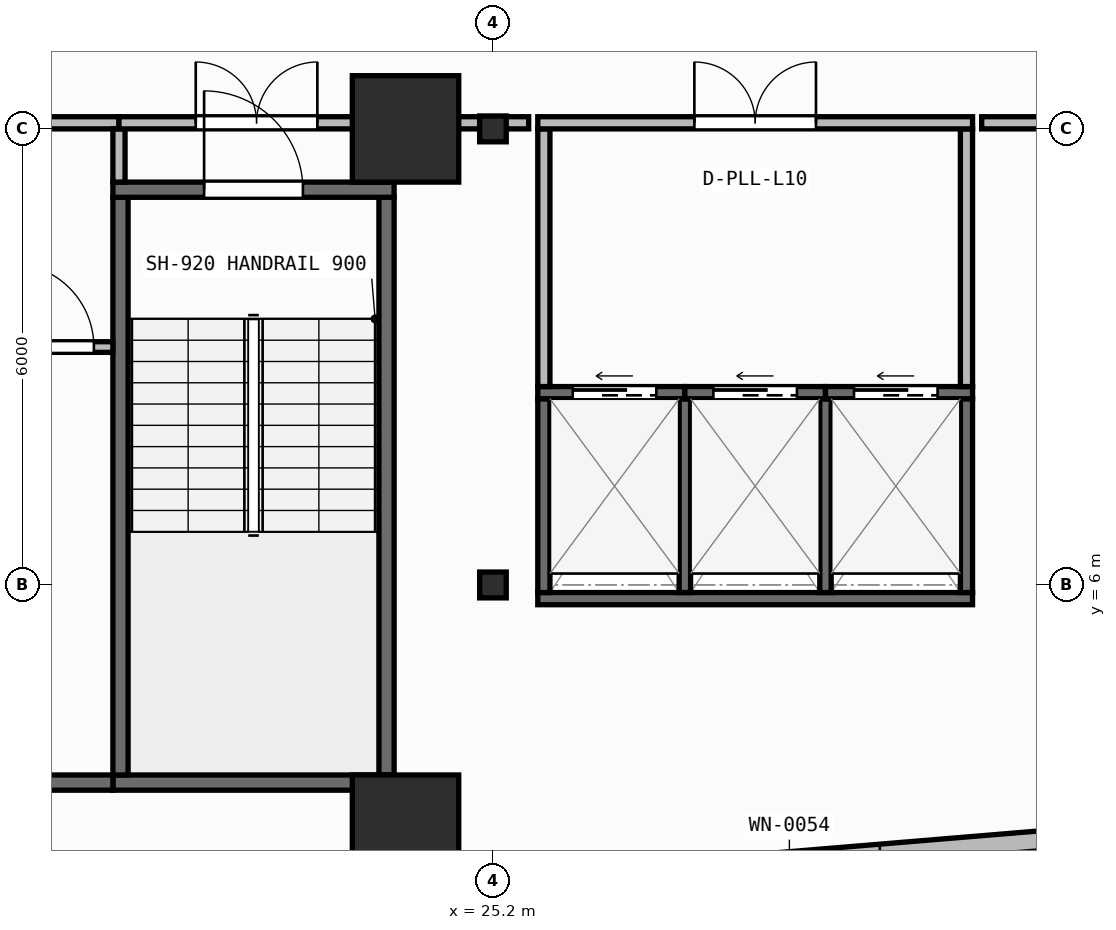
"""IFC4 building model, lengths in metres.
Left out: names, types, materials, properties, quantities, classifications, styles, units other than length and angle.
Written with IfcOpenShell. Run it as: python <this file> out.ifc"""

import sys

from ifc_helpers import new_model, si_unit, direction, frame, frame_2d, origin, origin_2d, place, context, subcontext, project, spatial, rectangle, i_section, extrude, element, fill, save


model = new_model("IFC4")
c1 = context("Model", 3, precision=1e-05, world=origin(), true_north=direction((0.0, 1.0)))
c2 = subcontext(c1, "Body", "Model", "MODEL_VIEW")
j1 = project(units=[si_unit("LENGTHUNIT", "METRE"), si_unit("PLANEANGLEUNIT", "RADIAN")], contexts=[c1])
p1 = place(None, origin())
s1 = spatial("IfcSite", under=j1, at=p1, CompositionType="ELEMENT")
p2 = place(p1, origin())
s2 = spatial("IfcBuilding", under=s1, at=p2, CompositionType="ELEMENT")
p3 = place(p2, frame((0.0, 0.0, 42.25)))
s3 = spatial("IfcBuildingStorey", under=s2, at=p3, CompositionType="ELEMENT", Elevation=42.25)
p4 = place(p3, frame((24.05, 2.8, 0.0), z_axis=(0.0, 0.0, 1.0), x_axis=(1.0, 0.0, 0.0)))
e1 = element("IfcColumn", 1, at=p4, inside=s3, PredefinedType="COLUMN", context=c2, shape_type="SweptSolid", body=[
    extrude(rectangle(XDim=1.4, YDim=1.4, at=origin_2d()), origin(), (0.0, 0.0, 1.0), 3.95),
])
p5 = place(p3, frame((25.2, 6.0, 0.0), z_axis=(0.0, 0.0, 1.0), x_axis=(1.0, 0.0, 0.0)))
e2 = element("IfcColumn", 2, at=p5, inside=s3, PredefinedType="COLUMN", context=c2, shape_type="SweptSolid", body=[
    extrude(i_section(OverallWidth=0.35, OverallDepth=0.34, WebThickness=0.016, FlangeThickness=0.028, at=origin_2d()), origin(), (0.0, 0.0, 1.0), 3.95),
])
p6 = place(p3, frame((24.05, 12.0, 0.0), z_axis=(0.0, 0.0, 1.0), x_axis=(1.0, 0.0, 0.0)))
e3 = element("IfcColumn", 3, at=p6, inside=s3, PredefinedType="COLUMN", context=c2, shape_type="SweptSolid", body=[
    extrude(rectangle(XDim=1.4, YDim=1.4, at=origin_2d()), origin(), (0.0, 0.0, 1.0), 3.95),
])
p7 = place(p3, frame((25.2, 12.0, 0.0), z_axis=(0.0, 0.0, 1.0), x_axis=(1.0, 0.0, 0.0)))
e4 = element("IfcColumn", 4, at=p7, inside=s3, PredefinedType="COLUMN", context=c2, shape_type="SweptSolid", body=[
    extrude(i_section(OverallWidth=0.35, OverallDepth=0.34, WebThickness=0.016, FlangeThickness=0.028, at=origin_2d()), origin(), (0.0, 0.0, 1.0), 3.95),
])
p8 = place(p3, frame((2.76, 0.174, 0.0), z_axis=(0.0, 0.0, 1.0), x_axis=(0.996571478456, 0.082736257641, 0.0)))
e5 = element("IfcWall", 5, at=p8, inside=s3, PredefinedType="STANDARD", context=c2, shape_type="SweptSolid", body=[
    extrude(rectangle(XDim=52.861, YDim=0.26, at=frame_2d((26.431, 0.0))), origin(), (0.0, 0.0, 1.0), 3.71),
])
p9 = place(p8, frame((25.231, 0.0, 0.9)))
e6 = element("IfcOpeningElement", 6, at=p9, cuts=e5, PredefinedType="OPENING", context=c2, shape_type="SweptSolid", body=[
    extrude(rectangle(XDim=2.4, YDim=1.65, at=frame_2d((1.2, 0.825))), frame((0.0, 0.14, 0.0), z_axis=(0.0, -1.0, 0.0), x_axis=(1.0, 0.0, 0.0)), (0.0, 0.0, 1.0), 0.28),
])
p10 = place(p3, frame((20.2, 3.4, 0.0), z_axis=(0.0, 0.0, 1.0), x_axis=(1.0, 0.0, 0.0)))
e7 = element("IfcWall", 7, at=p10, inside=s3, PredefinedType="SHEAR", context=c2, shape_type="SweptSolid", body=[
    extrude(rectangle(XDim=3.7, YDim=0.2, at=frame_2d((1.85, 0.0))), origin(), (0.0, 0.0, 1.0), 3.71),
])
for number, where, z_axis, x_axis in (
    (8, (20.3, 3.5, 0.0), (0.0, 0.0, 1.0), (0.0, 1.0, 0.0)),
    (9, (23.8, 3.5, 0.0), (0.0, 0.0, 1.0), (0.0, 1.0, 0.0)),
):
    element("IfcWall", number, at=place(p3, frame(where, z_axis=z_axis, x_axis=x_axis)), inside=s3, PredefinedType="SHEAR", context=c2, shape_type="SweptSolid", body=[
        extrude(rectangle(XDim=7.6, YDim=0.2, at=frame_2d((3.8, 0.0))), origin(), (0.0, 0.0, 1.0), 3.71),
    ])
p11 = place(p3, frame((20.2, 11.2, 0.0), z_axis=(0.0, 0.0, 1.0), x_axis=(1.0, 0.0, 0.0)))
e10 = element("IfcWall", 10, at=p11, inside=s3, PredefinedType="SHEAR", context=c2, shape_type="SweptSolid", body=[
    extrude(rectangle(XDim=3.7, YDim=0.2, at=frame_2d((1.85, 0.0))), origin(), (0.0, 0.0, 1.0), 3.71),
])
p12 = place(p11, frame((1.2, 0.0, 0.0)))
e11 = element("IfcOpeningElement", 11, at=p12, cuts=e10, PredefinedType="OPENING", context=c2, shape_type="SweptSolid", body=[
    extrude(rectangle(XDim=1.3, YDim=2.15, at=frame_2d((0.65, 1.075))), frame((0.0, 0.11, 0.0), z_axis=(0.0, -1.0, 0.0), x_axis=(1.0, 0.0, 0.0)), (0.0, 0.0, 1.0), 0.22),
])
p13 = place(p3, frame((6.5, 3.4, 0.0), z_axis=(0.0, 0.0, 1.0), x_axis=(1.0, 0.0, 0.0)))
e12 = element("IfcWall", 12, at=p13, inside=s3, PredefinedType="SHEAR", context=c2, shape_type="SweptSolid", body=[
    extrude(rectangle(XDim=13.7, YDim=0.2, at=frame_2d((6.85, 0.0))), origin(), (0.0, 0.0, 1.0), 3.71),
])
p14 = place(p3, frame((25.79, 5.82, 0.0), z_axis=(0.0, 0.0, 1.0), x_axis=(1.0, 0.0, 0.0)))
e13 = element("IfcWall", 13, at=p14, inside=s3, PredefinedType="SHEAR", context=c2, shape_type="SweptSolid", body=[
    extrude(rectangle(XDim=5.72, YDim=0.16, at=frame_2d((2.86, 0.0))), origin(), (0.0, 0.0, 1.0), 3.71),
])
for number, where, z_axis, x_axis in (
    (14, (25.87, 5.9, 0.0), (0.0, 0.0, 1.0), (0.0, 1.0, 0.0)),
    (15, (31.43, 5.9, 0.0), (0.0, 0.0, 1.0), (0.0, 1.0, 0.0)),
):
    element("IfcWall", number, at=place(p3, frame(where, z_axis=z_axis, x_axis=x_axis)), inside=s3, PredefinedType="SHEAR", context=c2, shape_type="SweptSolid", body=[
        extrude(rectangle(XDim=2.55, YDim=0.16, at=frame_2d((1.275, 0.0))), origin(), (0.0, 0.0, 1.0), 3.71),
    ])
for number, where, z_axis, x_axis in (
    (16, (27.725, 5.9, 0.0), (0.0, 0.0, 1.0), (0.0, 1.0, 0.0)),
    (17, (29.575, 5.9, 0.0), (0.0, 0.0, 1.0), (0.0, 1.0, 0.0)),
):
    element("IfcWall", number, at=place(p3, frame(where, z_axis=z_axis, x_axis=x_axis)), inside=s3, PredefinedType="SHEAR", context=c2, shape_type="SweptSolid", body=[
        extrude(rectangle(XDim=2.55, YDim=0.15, at=frame_2d((1.275, 0.0))), origin(), (0.0, 0.0, 1.0), 3.71),
    ])
p15 = place(p3, frame((25.79, 8.53, 0.0), z_axis=(0.0, 0.0, 1.0), x_axis=(1.0, 0.0, 0.0)))
e18 = element("IfcWall", 18, at=p15, inside=s3, PredefinedType="SHEAR", context=c2, shape_type="SweptSolid", body=[
    extrude(rectangle(XDim=1.935, YDim=0.16, at=frame_2d((0.968, 0.0))), origin(), (0.0, 0.0, 1.0), 3.71),
])
p16 = place(p15, frame((0.46, 0.0, 0.0)))
e19 = element("IfcOpeningElement", 19, at=p16, cuts=e18, PredefinedType="OPENING", context=c2, shape_type="SweptSolid", body=[
    extrude(rectangle(XDim=1.1, YDim=2.15, at=frame_2d((0.55, 1.075))), frame((0.0, 0.09, 0.0), z_axis=(0.0, -1.0, 0.0), x_axis=(1.0, 0.0, 0.0)), (0.0, 0.0, 1.0), 0.18),
])
p17 = place(p3, frame((27.725, 8.53, 0.0), z_axis=(0.0, 0.0, 1.0), x_axis=(1.0, 0.0, 0.0)))
e20 = element("IfcWall", 20, at=p17, inside=s3, PredefinedType="SHEAR", context=c2, shape_type="SweptSolid", body=[
    extrude(rectangle(XDim=1.85, YDim=0.16, at=frame_2d((0.925, 0.0))), origin(), (0.0, 0.0, 1.0), 3.71),
])
p18 = place(p17, frame((0.375, 0.0, 0.0)))
e21 = element("IfcOpeningElement", 21, at=p18, cuts=e20, PredefinedType="OPENING", context=c2, shape_type="SweptSolid", body=[
    extrude(rectangle(XDim=1.1, YDim=2.15, at=frame_2d((0.55, 1.075))), frame((0.0, 0.09, 0.0), z_axis=(0.0, -1.0, 0.0), x_axis=(1.0, 0.0, 0.0)), (0.0, 0.0, 1.0), 0.18),
])
p19 = place(p3, frame((29.575, 8.53, 0.0), z_axis=(0.0, 0.0, 1.0), x_axis=(1.0, 0.0, 0.0)))
e22 = element("IfcWall", 22, at=p19, inside=s3, PredefinedType="SHEAR", context=c2, shape_type="SweptSolid", body=[
    extrude(rectangle(XDim=1.935, YDim=0.16, at=frame_2d((0.968, 0.0))), origin(), (0.0, 0.0, 1.0), 3.71),
])
p20 = place(p19, frame((0.375, 0.0, 0.0)))
e23 = element("IfcOpeningElement", 23, at=p20, cuts=e22, PredefinedType="OPENING", context=c2, shape_type="SweptSolid", body=[
    extrude(rectangle(XDim=1.1, YDim=2.15, at=frame_2d((0.55, 1.075))), frame((0.0, 0.09, 0.0), z_axis=(0.0, -1.0, 0.0), x_axis=(1.0, 0.0, 0.0)), (0.0, 0.0, 1.0), 0.18),
])
p21 = place(p3, frame((18.61, 9.13, 0.0), z_axis=(0.0, 0.0, 1.0), x_axis=(1.0, 0.0, 0.0)))
e24 = element("IfcWall", 24, at=p21, inside=s3, PredefinedType="PARTITIONING", context=c2, shape_type="SweptSolid", body=[
    extrude(rectangle(XDim=1.59, YDim=0.14, at=frame_2d((0.795, 0.0))), origin(), (0.0, 0.0, 1.0), 3.71),
])
p22 = place(p21, frame((0.24, 0.0, 0.0)))
e25 = element("IfcOpeningElement", 25, at=p22, cuts=e24, PredefinedType="OPENING", context=c2, shape_type="SweptSolid", body=[
    extrude(rectangle(XDim=1.1, YDim=2.1, at=frame_2d((0.55, 1.05))), frame((0.0, 0.08, 0.0), z_axis=(0.0, -1.0, 0.0), x_axis=(1.0, 0.0, 0.0)), (0.0, 0.0, 1.0), 0.16),
])
p23 = place(p3, frame((12.58, 12.08, 0.0), z_axis=(0.0, 0.0, 1.0), x_axis=(1.0, 0.0, 0.0)))
e26 = element("IfcWall", 26, at=p23, inside=s3, PredefinedType="PARTITIONING", context=c2, shape_type="SweptSolid", body=[
    extrude(rectangle(XDim=7.7, YDim=0.16, at=frame_2d((3.85, 0.0))), origin(), (0.0, 0.0, 1.0), 3.073),
])
p24 = place(p23, frame((3.05, 0.0, 0.0)))
e27 = element("IfcOpeningElement", 27, at=p24, cuts=e26, PredefinedType="OPENING", context=c2, shape_type="SweptSolid", body=[
    extrude(rectangle(XDim=1.6, YDim=2.05, at=frame_2d((0.8, 1.025))), frame((0.0, 0.09, 0.0), z_axis=(0.0, -1.0, 0.0), x_axis=(1.0, 0.0, 0.0)), (0.0, 0.0, 1.0), 0.18),
])
p25 = place(p3, frame((20.28, 11.3, 0.0), z_axis=(0.0, 0.0, 1.0), x_axis=(0.0, 1.0, 0.0)))
e28 = element("IfcWall", 28, at=p25, inside=s3, PredefinedType="PARTITIONING", context=c2, shape_type="SweptSolid", body=[
    extrude(rectangle(XDim=0.7, YDim=0.16, at=frame_2d((0.35, 0.0))), origin(), (0.0, 0.0, 1.0), 3.71),
])
p26 = place(p3, frame((20.28, 12.08, 0.0), z_axis=(0.0, 0.0, 1.0), x_axis=(1.0, 0.0, 0.0)))
e29 = element("IfcWall", 29, at=p26, inside=s3, PredefinedType="PARTITIONING", context=c2, shape_type="SweptSolid", body=[
    extrude(rectangle(XDim=3.62, YDim=0.16, at=frame_2d((1.81, 0.0))), origin(), (0.0, 0.0, 1.0), 3.073),
])
p27 = place(p26, frame((1.01, 0.0, 0.0)))
e30 = element("IfcOpeningElement", 30, at=p27, cuts=e29, PredefinedType="OPENING", context=c2, shape_type="SweptSolid", body=[
    extrude(rectangle(XDim=1.6, YDim=2.05, at=frame_2d((0.8, 1.025))), frame((0.0, 0.09, 0.0), z_axis=(0.0, -1.0, 0.0), x_axis=(1.0, 0.0, 0.0)), (0.0, 0.0, 1.0), 0.18),
])
p28 = place(p3, frame((23.82, 11.3, 0.0), z_axis=(0.0, 0.0, 1.0), x_axis=(0.0, 1.0, 0.0)))
e31 = element("IfcWall", 31, at=p28, inside=s3, PredefinedType="PARTITIONING", context=c2, shape_type="SweptSolid", body=[
    extrude(rectangle(XDim=0.7, YDim=0.16, at=frame_2d((0.35, 0.0))), origin(), (0.0, 0.0, 1.0), 3.71),
])
for number, where, z_axis, x_axis in (
    (32, (25.87, 8.61, 0.0), (0.0, 0.0, 1.0), (0.0, 1.0, 0.0)),
    (33, (31.43, 8.61, 0.0), (0.0, 0.0, 1.0), (0.0, 1.0, 0.0)),
):
    element("IfcWall", number, at=place(p3, frame(where, z_axis=z_axis, x_axis=x_axis)), inside=s3, PredefinedType="PARTITIONING", context=c2, shape_type="SweptSolid", body=[
        extrude(rectangle(XDim=3.39, YDim=0.16, at=frame_2d((1.695, 0.0))), origin(), (0.0, 0.0, 1.0), 3.71),
    ])
p29 = place(p3, frame((25.79, 12.08, 0.0), z_axis=(0.0, 0.0, 1.0), x_axis=(1.0, 0.0, 0.0)))
e34 = element("IfcWall", 34, at=p29, inside=s3, PredefinedType="PARTITIONING", context=c2, shape_type="SweptSolid", body=[
    extrude(rectangle(XDim=5.72, YDim=0.16, at=frame_2d((2.86, 0.0))), origin(), (0.0, 0.0, 1.0), 3.073),
])
p30 = place(p29, frame((2.06, 0.0, 0.0)))
e35 = element("IfcOpeningElement", 35, at=p30, cuts=e34, PredefinedType="OPENING", context=c2, shape_type="SweptSolid", body=[
    extrude(rectangle(XDim=1.6, YDim=2.05, at=frame_2d((0.8, 1.025))), frame((0.0, 0.09, 0.0), z_axis=(0.0, -1.0, 0.0), x_axis=(1.0, 0.0, 0.0)), (0.0, 0.0, 1.0), 0.18),
])
p31 = place(p3, frame((24.02, 12.08, 0.0), z_axis=(0.0, 0.0, 1.0), x_axis=(1.0, 0.0, 0.0)))
e36 = element("IfcWall", 36, at=p31, inside=s3, PredefinedType="PARTITIONING", context=c2, shape_type="SweptSolid", body=[
    extrude(rectangle(XDim=1.65, YDim=0.16, at=frame_2d((0.825, 0.0))), origin(), (0.0, 0.0, 1.0), 3.073),
])
p32 = place(p3, frame((31.63, 12.08, 0.0), z_axis=(0.0, 0.0, 1.0), x_axis=(1.0, 0.0, 0.0)))
e37 = element("IfcWall", 37, at=p32, inside=s3, PredefinedType="PARTITIONING", context=c2, shape_type="SweptSolid", body=[
    extrude(rectangle(XDim=11.181, YDim=0.16, at=frame_2d((5.59, 0.0))), origin(), (0.0, 0.0, 1.0), 3.073),
])
p33 = place(p12, origin())
e38 = element("IfcDoor", 38, at=p33, inside=s3, OperationType="SINGLE_SWING_LEFT", PredefinedType="DOOR", context=c2, shape_type="SweptSolid", body=[
    extrude(rectangle(XDim=1.3, YDim=2.15, at=frame_2d((0.65, 1.075))), frame((0.0, 0.025, 0.0), z_axis=(0.0, -1.0, 0.0), x_axis=(1.0, 0.0, 0.0)), (0.0, 0.0, 1.0), 0.05),
])
fill(e11, e38)
p34 = place(p16, origin())
e39 = element("IfcDoor", 39, at=p34, inside=s3, OperationType="SLIDING_TO_LEFT", PredefinedType="DOOR", context=c2, shape_type="SweptSolid", body=[
    extrude(rectangle(XDim=1.1, YDim=2.15, at=frame_2d((0.55, 1.075))), frame((0.0, 0.025, 0.0), z_axis=(0.0, -1.0, 0.0), x_axis=(1.0, 0.0, 0.0)), (0.0, 0.0, 1.0), 0.05),
])
fill(e19, e39)
p35 = place(p18, origin())
e40 = element("IfcDoor", 40, at=p35, inside=s3, OperationType="SLIDING_TO_LEFT", PredefinedType="DOOR", context=c2, shape_type="SweptSolid", body=[
    extrude(rectangle(XDim=1.1, YDim=2.15, at=frame_2d((0.55, 1.075))), frame((0.0, 0.025, 0.0), z_axis=(0.0, -1.0, 0.0), x_axis=(1.0, 0.0, 0.0)), (0.0, 0.0, 1.0), 0.05),
])
fill(e21, e40)
p36 = place(p20, origin())
e41 = element("IfcDoor", 41, at=p36, inside=s3, OperationType="SLIDING_TO_LEFT", PredefinedType="DOOR", context=c2, shape_type="SweptSolid", body=[
    extrude(rectangle(XDim=1.1, YDim=2.15, at=frame_2d((0.55, 1.075))), frame((0.0, 0.025, 0.0), z_axis=(0.0, -1.0, 0.0), x_axis=(1.0, 0.0, 0.0)), (0.0, 0.0, 1.0), 0.05),
])
fill(e23, e41)
p37 = place(p22, origin())
e42 = element("IfcDoor", 42, at=p37, inside=s3, OperationType="SINGLE_SWING_LEFT", PredefinedType="DOOR", context=c2, shape_type="SweptSolid", body=[
    extrude(rectangle(XDim=1.1, YDim=2.1, at=frame_2d((0.55, 1.05))), frame((0.0, 0.025, 0.0), z_axis=(0.0, -1.0, 0.0), x_axis=(1.0, 0.0, 0.0)), (0.0, 0.0, 1.0), 0.05),
])
fill(e25, e42)
p38 = place(p27, origin())
e43 = element("IfcDoor", 43, at=p38, inside=s3, OperationType="DOUBLE_DOOR_SINGLE_SWING", PredefinedType="DOOR", context=c2, shape_type="SweptSolid", body=[
    extrude(rectangle(XDim=1.6, YDim=2.05, at=frame_2d((0.8, 1.025))), frame((0.0, 0.025, 0.0), z_axis=(0.0, -1.0, 0.0), x_axis=(1.0, 0.0, 0.0)), (0.0, 0.0, 1.0), 0.05),
])
fill(e30, e43)
p39 = place(p30, origin())
e44 = element("IfcDoor", 44, at=p39, inside=s3, OperationType="DOUBLE_DOOR_SINGLE_SWING", PredefinedType="DOOR", context=c2, shape_type="SweptSolid", body=[
    extrude(rectangle(XDim=1.6, YDim=2.05, at=frame_2d((0.8, 1.025))), frame((0.0, 0.025, 0.0), z_axis=(0.0, -1.0, 0.0), x_axis=(1.0, 0.0, 0.0)), (0.0, 0.0, 1.0), 0.05),
])
fill(e35, e44)
save(model, sys.argv[1])
